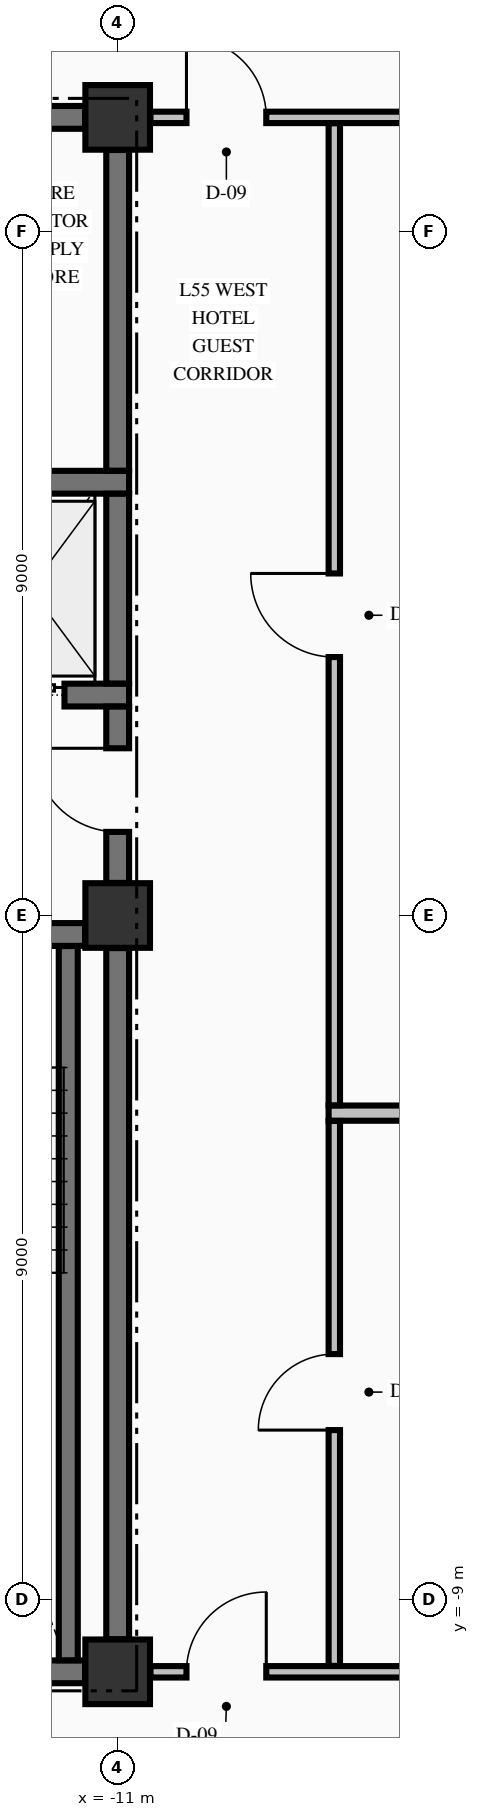
"""IFC4 building model, lengths in metres.
Left out: names, types, materials, properties, quantities, classifications, styles, units other than length and angle.
Written with IfcOpenShell. Run it as: python <this file> out.ifc"""

import sys

from ifc_helpers import new_model, si_unit, direction, frame, frame_2d, origin, origin_2d, place, context, subcontext, project, spatial, rectangle, extrude, element, fill, save


model = new_model("IFC4")
c1 = context("Model", 3, precision=1e-05, world=origin(), true_north=direction((0.0, 1.0)))
c2 = subcontext(c1, "Body", "Model", "MODEL_VIEW")
j1 = project(units=[si_unit("LENGTHUNIT", "METRE"), si_unit("PLANEANGLEUNIT", "RADIAN")], contexts=[c1])
p1 = place(None, origin())
s1 = spatial("IfcSite", under=j1, at=p1, CompositionType="ELEMENT")
p2 = place(p1, origin())
s2 = spatial("IfcBuilding", under=s1, at=p2, CompositionType="ELEMENT")
p3 = place(p2, frame((0.0, 0.0, 211.86)))
s3 = spatial("IfcBuildingStorey", under=s2, at=p3, CompositionType="ELEMENT", Elevation=211.86)
for number, where, z_axis, x_axis in (
    (1, (-11.0, -9.95, -0.325), (0.0, 0.0, 1.0), (1.0, 0.0, 0.0)),
    (2, (-11.0, 0.0, -0.325), (0.0, 0.0, 1.0), (1.0, 0.0, 0.0)),
    (3, (-11.0, 10.5, -0.325), (0.0, 0.0, 1.0), (1.0, 0.0, 0.0)),
):
    element("IfcColumn", number, at=place(p3, frame(where, z_axis=z_axis, x_axis=x_axis)), inside=s3, PredefinedType="COLUMN", context=c2, shape_type="SweptSolid", body=[
        extrude(rectangle(XDim=0.85, YDim=0.85, at=origin_2d()), origin(), (0.0, 0.0, 1.0), 3.475),
    ])
p4 = place(p3, frame((-14.7, -9.95, 0.0), z_axis=(0.0, 0.0, 1.0), x_axis=(1.0, 0.0, 0.0)))
e4 = element("IfcWall", 4, at=p4, inside=s3, PredefinedType="SHEAR", context=c2, shape_type="SweptSolid", body=[
    extrude(rectangle(XDim=3.271, YDim=0.3, at=frame_2d((1.635, 0.0))), origin(), (0.0, 0.0, 1.0), 3.15),
])
p5 = place(p3, frame((-19.571, -0.25, 0.0), z_axis=(0.0, 0.0, 1.0), x_axis=(1.0, 0.0, 0.0)))
e5 = element("IfcWall", 5, at=p5, inside=s3, PredefinedType="SHEAR", context=c2, shape_type="SweptSolid", body=[
    extrude(rectangle(XDim=8.142, YDim=0.3, at=frame_2d((4.071, 0.0))), origin(), (0.0, 0.0, 1.0), 3.15),
])
p6 = place(p5, frame((5.871, 0.0, 0.0)))
e6 = element("IfcOpeningElement", 6, at=p6, cuts=e5, PredefinedType="OPENING", context=c2, shape_type="SweptSolid", body=[
    extrude(rectangle(XDim=1.1, YDim=2.15, at=frame_2d((0.55, 1.075))), frame((0.0, 0.16, 0.0), z_axis=(0.0, -1.0, 0.0), x_axis=(1.0, 0.0, 0.0)), (0.0, 0.0, 1.0), 0.32),
])
p7 = place(p3, frame((-14.875, 2.9, 0.0), z_axis=(0.0, 0.0, 1.0), x_axis=(1.0, 0.0, 0.0)))
e7 = element("IfcWall", 7, at=p7, inside=s3, PredefinedType="SHEAR", context=c2, shape_type="SweptSolid", body=[
    extrude(rectangle(XDim=4.025, YDim=0.3, at=frame_2d((2.012, 0.0))), origin(), (0.0, 0.0, 1.0), 3.15),
])
p8 = place(p7, frame((2.075, 0.0, 0.0)))
e8 = element("IfcOpeningElement", 8, at=p8, cuts=e7, PredefinedType="OPENING", context=c2, shape_type="SweptSolid", body=[
    extrude(rectangle(XDim=1.1, YDim=2.2, at=frame_2d((0.55, 1.1))), frame((0.0, 0.16, 0.0), z_axis=(0.0, -1.0, 0.0), x_axis=(1.0, 0.0, 0.0)), (0.0, 0.0, 1.0), 0.32),
])
p9 = place(p3, frame((-14.875, 5.7, 0.0), z_axis=(0.0, 0.0, 1.0), x_axis=(1.0, 0.0, 0.0)))
e9 = element("IfcWall", 9, at=p9, inside=s3, PredefinedType="SHEAR", context=c2, shape_type="SweptSolid", body=[
    extrude(rectangle(XDim=4.025, YDim=0.3, at=frame_2d((2.012, 0.0))), origin(), (0.0, 0.0, 1.0), 3.15),
])
p10 = place(p3, frame((-14.7, 10.5, 0.0), z_axis=(0.0, 0.0, 1.0), x_axis=(1.0, 0.0, 0.0)))
e10 = element("IfcWall", 10, at=p10, inside=s3, PredefinedType="SHEAR", context=c2, shape_type="SweptSolid", body=[
    extrude(rectangle(XDim=3.271, YDim=0.3, at=frame_2d((1.635, 0.0))), origin(), (0.0, 0.0, 1.0), 3.15),
])
p11 = place(p10, frame((0.245, 0.0, 0.0)))
e11 = element("IfcOpeningElement", 11, at=p11, cuts=e10, PredefinedType="OPENING", context=c2, shape_type="SweptSolid", body=[
    extrude(rectangle(XDim=0.95, YDim=2.15, at=frame_2d((0.475, 1.075))), frame((0.0, 0.16, 0.0), z_axis=(0.0, -1.0, 0.0), x_axis=(1.0, 0.0, 0.0)), (0.0, 0.0, 1.0), 0.32),
])
p12 = place(p3, frame((-10.569, -9.95, 0.0), z_axis=(0.0, 0.0, 1.0), x_axis=(1.0, 0.0, 0.0)))
e12 = element("IfcWall", 12, at=p12, inside=s3, PredefinedType="PARTITIONING", context=c2, shape_type="SweptSolid", body=[
    extrude(rectangle(XDim=21.138, YDim=0.15, at=frame_2d((10.569, 0.0))), origin(), (0.0, 0.0, 1.0), 3.15),
])
p13 = place(p12, frame((0.474, 0.0, 0.0)))
e13 = element("IfcOpeningElement", 13, at=p13, cuts=e12, PredefinedType="OPENING", context=c2, shape_type="SweptSolid", body=[
    extrude(rectangle(XDim=1.05, YDim=2.15, at=frame_2d((0.525, 1.075))), frame((0.0, 0.085, 0.0), z_axis=(0.0, -1.0, 0.0), x_axis=(1.0, 0.0, 0.0)), (0.0, 0.0, 1.0), 0.17),
])
p14 = place(p12, frame((19.614, 0.0, 0.0)))
e14 = element("IfcOpeningElement", 14, at=p14, cuts=e12, PredefinedType="OPENING", context=c2, shape_type="SweptSolid", body=[
    extrude(rectangle(XDim=1.05, YDim=2.15, at=frame_2d((0.525, 1.075))), frame((0.0, 0.085, 0.0), z_axis=(0.0, -1.0, 0.0), x_axis=(1.0, 0.0, 0.0)), (0.0, 0.0, 1.0), 0.17),
])
p15 = place(p12, frame((11.774, 0.0, 0.0)))
e15 = element("IfcOpeningElement", 15, at=p15, cuts=e12, PredefinedType="OPENING", context=c2, shape_type="SweptSolid", body=[
    extrude(rectangle(XDim=0.95, YDim=2.15, at=frame_2d((0.475, 1.075))), frame((0.0, 0.085, 0.0), z_axis=(0.0, -1.0, 0.0), x_axis=(1.0, 0.0, 0.0)), (0.0, 0.0, 1.0), 0.17),
])
p16 = place(p3, frame((-8.225, -2.6, 0.0), z_axis=(0.0, 0.0, 1.0), x_axis=(1.0, 0.0, 0.0)))
e16 = element("IfcWall", 16, at=p16, inside=s3, PredefinedType="PARTITIONING", context=c2, shape_type="SweptSolid", body=[
    extrude(rectangle(XDim=6.525, YDim=0.2, at=frame_2d((3.263, 0.0))), origin(), (0.0, 0.0, 1.0), 3.15),
])
p17 = place(p3, frame((-10.569, 10.5, 0.0), z_axis=(0.0, 0.0, 1.0), x_axis=(1.0, 0.0, 0.0)))
e17 = element("IfcWall", 17, at=p17, inside=s3, PredefinedType="PARTITIONING", context=c2, shape_type="SweptSolid", body=[
    extrude(rectangle(XDim=21.138, YDim=0.15, at=frame_2d((10.569, 0.0))), origin(), (0.0, 0.0, 1.0), 3.15),
])
p18 = place(p17, frame((0.474, 0.0, 0.0)))
e18 = element("IfcOpeningElement", 18, at=p18, cuts=e17, PredefinedType="OPENING", context=c2, shape_type="SweptSolid", body=[
    extrude(rectangle(XDim=1.05, YDim=2.15, at=frame_2d((0.525, 1.075))), frame((0.0, 0.085, 0.0), z_axis=(0.0, -1.0, 0.0), x_axis=(1.0, 0.0, 0.0)), (0.0, 0.0, 1.0), 0.17),
])
p19 = place(p17, frame((19.614, 0.0, 0.0)))
e19 = element("IfcOpeningElement", 19, at=p19, cuts=e17, PredefinedType="OPENING", context=c2, shape_type="SweptSolid", body=[
    extrude(rectangle(XDim=1.05, YDim=2.15, at=frame_2d((0.525, 1.075))), frame((0.0, 0.085, 0.0), z_axis=(0.0, -1.0, 0.0), x_axis=(1.0, 0.0, 0.0)), (0.0, 0.0, 1.0), 0.17),
])
p20 = place(p3, frame((-11.65, -9.798, 0.0), z_axis=(0.0, 0.0, 1.0), x_axis=(0.0, 1.0, 0.0)))
e20 = element("IfcWall", 20, at=p20, inside=s3, PredefinedType="SOLIDWALL", context=c2, shape_type="SweptSolid", body=[
    extrude(rectangle(XDim=9.396, YDim=0.25, at=frame_2d((4.698, 0.0))), origin(), (0.0, 0.0, 1.0), 3.15),
])
p21 = place(p3, frame((-11.0, -9.521, 0.0), z_axis=(0.0, 0.0, 1.0), x_axis=(0.0, 1.0, 0.0)))
e21 = element("IfcWall", 21, at=p21, inside=s3, PredefinedType="SHEAR", context=c2, shape_type="SweptSolid", body=[
    extrude(rectangle(XDim=9.092, YDim=0.3, at=frame_2d((4.546, 0.0))), origin(), (0.0, 0.0, 1.0), 3.15),
])
p22 = place(p3, frame((-11.0, 0.429, 0.0), z_axis=(0.0, 0.0, 1.0), x_axis=(0.0, 1.0, 0.0)))
e22 = element("IfcWall", 22, at=p22, inside=s3, PredefinedType="SHEAR", context=c2, shape_type="SweptSolid", body=[
    extrude(rectangle(XDim=2.319, YDim=0.3, at=frame_2d((1.16, 0.0))), origin(), (0.0, 0.0, 1.0), 3.15),
])
p23 = place(p22, frame((0.671, 0.0, 0.0)))
e23 = element("IfcOpeningElement", 23, at=p23, cuts=e22, PredefinedType="OPENING", context=c2, shape_type="SweptSolid", body=[
    extrude(rectangle(XDim=1.1, YDim=2.15, at=frame_2d((0.55, 1.075))), frame((0.0, 0.16, 0.0), z_axis=(0.0, -1.0, 0.0), x_axis=(1.0, 0.0, 0.0)), (0.0, 0.0, 1.0), 0.32),
])
p24 = place(p3, frame((-11.0, 3.052, 0.0), z_axis=(0.0, 0.0, 1.0), x_axis=(0.0, 1.0, 0.0)))
e24 = element("IfcWall", 24, at=p24, inside=s3, PredefinedType="SHEAR", context=c2, shape_type="SweptSolid", body=[
    extrude(rectangle(XDim=2.496, YDim=0.3, at=frame_2d((1.248, 0.0))), origin(), (0.0, 0.0, 1.0), 3.15),
])
p25 = place(p3, frame((-11.0, 5.852, 0.0), z_axis=(0.0, 0.0, 1.0), x_axis=(0.0, 1.0, 0.0)))
e25 = element("IfcWall", 25, at=p25, inside=s3, PredefinedType="SHEAR", context=c2, shape_type="SweptSolid", body=[
    extrude(rectangle(XDim=4.219, YDim=0.3, at=frame_2d((2.109, 0.0))), origin(), (0.0, 0.0, 1.0), 3.15),
])
p26 = place(p3, frame((-8.15, -9.872, 0.0), z_axis=(0.0, 0.0, 1.0), x_axis=(0.0, 1.0, 0.0)))
e26 = element("IfcWall", 26, at=p26, inside=s3, PredefinedType="PARTITIONING", context=c2, shape_type="SweptSolid", body=[
    extrude(rectangle(XDim=7.169, YDim=0.15, at=frame_2d((3.584, 0.0))), origin(), (0.0, 0.0, 1.0), 3.15),
])
p27 = place(p26, frame((3.102, 0.0, 0.0)))
e27 = element("IfcOpeningElement", 27, at=p27, cuts=e26, PredefinedType="OPENING", context=c2, shape_type="SweptSolid", body=[
    extrude(rectangle(XDim=1.0, YDim=2.15, at=frame_2d((0.5, 1.075))), frame((0.0, 0.085, 0.0), z_axis=(0.0, -1.0, 0.0), x_axis=(1.0, 0.0, 0.0)), (0.0, 0.0, 1.0), 0.17),
])
p28 = place(p3, frame((-8.15, -2.497, 0.0), z_axis=(0.0, 0.0, 1.0), x_axis=(0.0, 1.0, 0.0)))
e28 = element("IfcWall", 28, at=p28, inside=s3, PredefinedType="PARTITIONING", context=c2, shape_type="SweptSolid", body=[
    extrude(rectangle(XDim=12.919, YDim=0.15, at=frame_2d((6.459, 0.0))), origin(), (0.0, 0.0, 1.0), 3.15),
])
p29 = place(p28, frame((5.897, 0.0, 0.0)))
e29 = element("IfcOpeningElement", 29, at=p29, cuts=e28, PredefinedType="OPENING", context=c2, shape_type="SweptSolid", body=[
    extrude(rectangle(XDim=1.1, YDim=2.15, at=frame_2d((0.55, 1.075))), frame((0.0, 0.085, 0.0), z_axis=(0.0, -1.0, 0.0), x_axis=(1.0, 0.0, 0.0)), (0.0, 0.0, 1.0), 0.17),
])
p30 = place(p23, origin())
e30 = element("IfcDoor", 30, at=p30, inside=s3, OperationType="SINGLE_SWING_RIGHT", PredefinedType="DOOR", context=c2, shape_type="SweptSolid", body=[
    extrude(rectangle(XDim=1.1, YDim=2.15, at=frame_2d((0.55, 1.075))), frame((0.0, 0.025, 0.0), z_axis=(0.0, -1.0, 0.0), x_axis=(1.0, 0.0, 0.0)), (0.0, 0.0, 1.0), 0.05),
])
fill(e23, e30)
p31 = place(p8, origin())
e31 = element("IfcDoor", 31, at=p31, inside=s3, OperationType="SLIDING_TO_LEFT", PredefinedType="DOOR", context=c2, shape_type="SweptSolid", body=[
    extrude(rectangle(XDim=1.1, YDim=2.2, at=frame_2d((0.55, 1.1))), frame((0.0, 0.025, 0.0), z_axis=(0.0, -1.0, 0.0), x_axis=(1.0, 0.0, 0.0)), (0.0, 0.0, 1.0), 0.05),
])
fill(e8, e31)
p32 = place(p18, origin())
e32 = element("IfcDoor", 32, at=p32, inside=s3, OperationType="SINGLE_SWING_LEFT", PredefinedType="DOOR", context=c2, shape_type="SweptSolid", body=[
    extrude(rectangle(XDim=1.05, YDim=2.15, at=frame_2d((0.525, 1.075))), frame((0.0, 0.025, 0.0), z_axis=(0.0, -1.0, 0.0), x_axis=(1.0, 0.0, 0.0)), (0.0, 0.0, 1.0), 0.05),
])
fill(e18, e32)
p33 = place(p13, origin())
e33 = element("IfcDoor", 33, at=p33, inside=s3, OperationType="SINGLE_SWING_RIGHT", PredefinedType="DOOR", context=c2, shape_type="SweptSolid", body=[
    extrude(rectangle(XDim=1.05, YDim=2.15, at=frame_2d((0.525, 1.075))), frame((0.0, 0.025, 0.0), z_axis=(0.0, -1.0, 0.0), x_axis=(1.0, 0.0, 0.0)), (0.0, 0.0, 1.0), 0.05),
])
fill(e13, e33)
p34 = place(p29, origin())
e34 = element("IfcDoor", 34, at=p34, inside=s3, OperationType="SINGLE_SWING_RIGHT", PredefinedType="DOOR", context=c2, shape_type="SweptSolid", body=[
    extrude(rectangle(XDim=1.1, YDim=2.15, at=frame_2d((0.55, 1.075))), frame((0.0, 0.025, 0.0), z_axis=(0.0, -1.0, 0.0), x_axis=(1.0, 0.0, 0.0)), (0.0, 0.0, 1.0), 0.05),
])
fill(e29, e34)
p35 = place(p27, origin())
e35 = element("IfcDoor", 35, at=p35, inside=s3, OperationType="SINGLE_SWING_LEFT", PredefinedType="DOOR", context=c2, shape_type="SweptSolid", body=[
    extrude(rectangle(XDim=1.0, YDim=2.15, at=frame_2d((0.5, 1.075))), frame((0.0, 0.025, 0.0), z_axis=(0.0, -1.0, 0.0), x_axis=(1.0, 0.0, 0.0)), (0.0, 0.0, 1.0), 0.05),
])
fill(e27, e35)
save(model, sys.argv[1])
